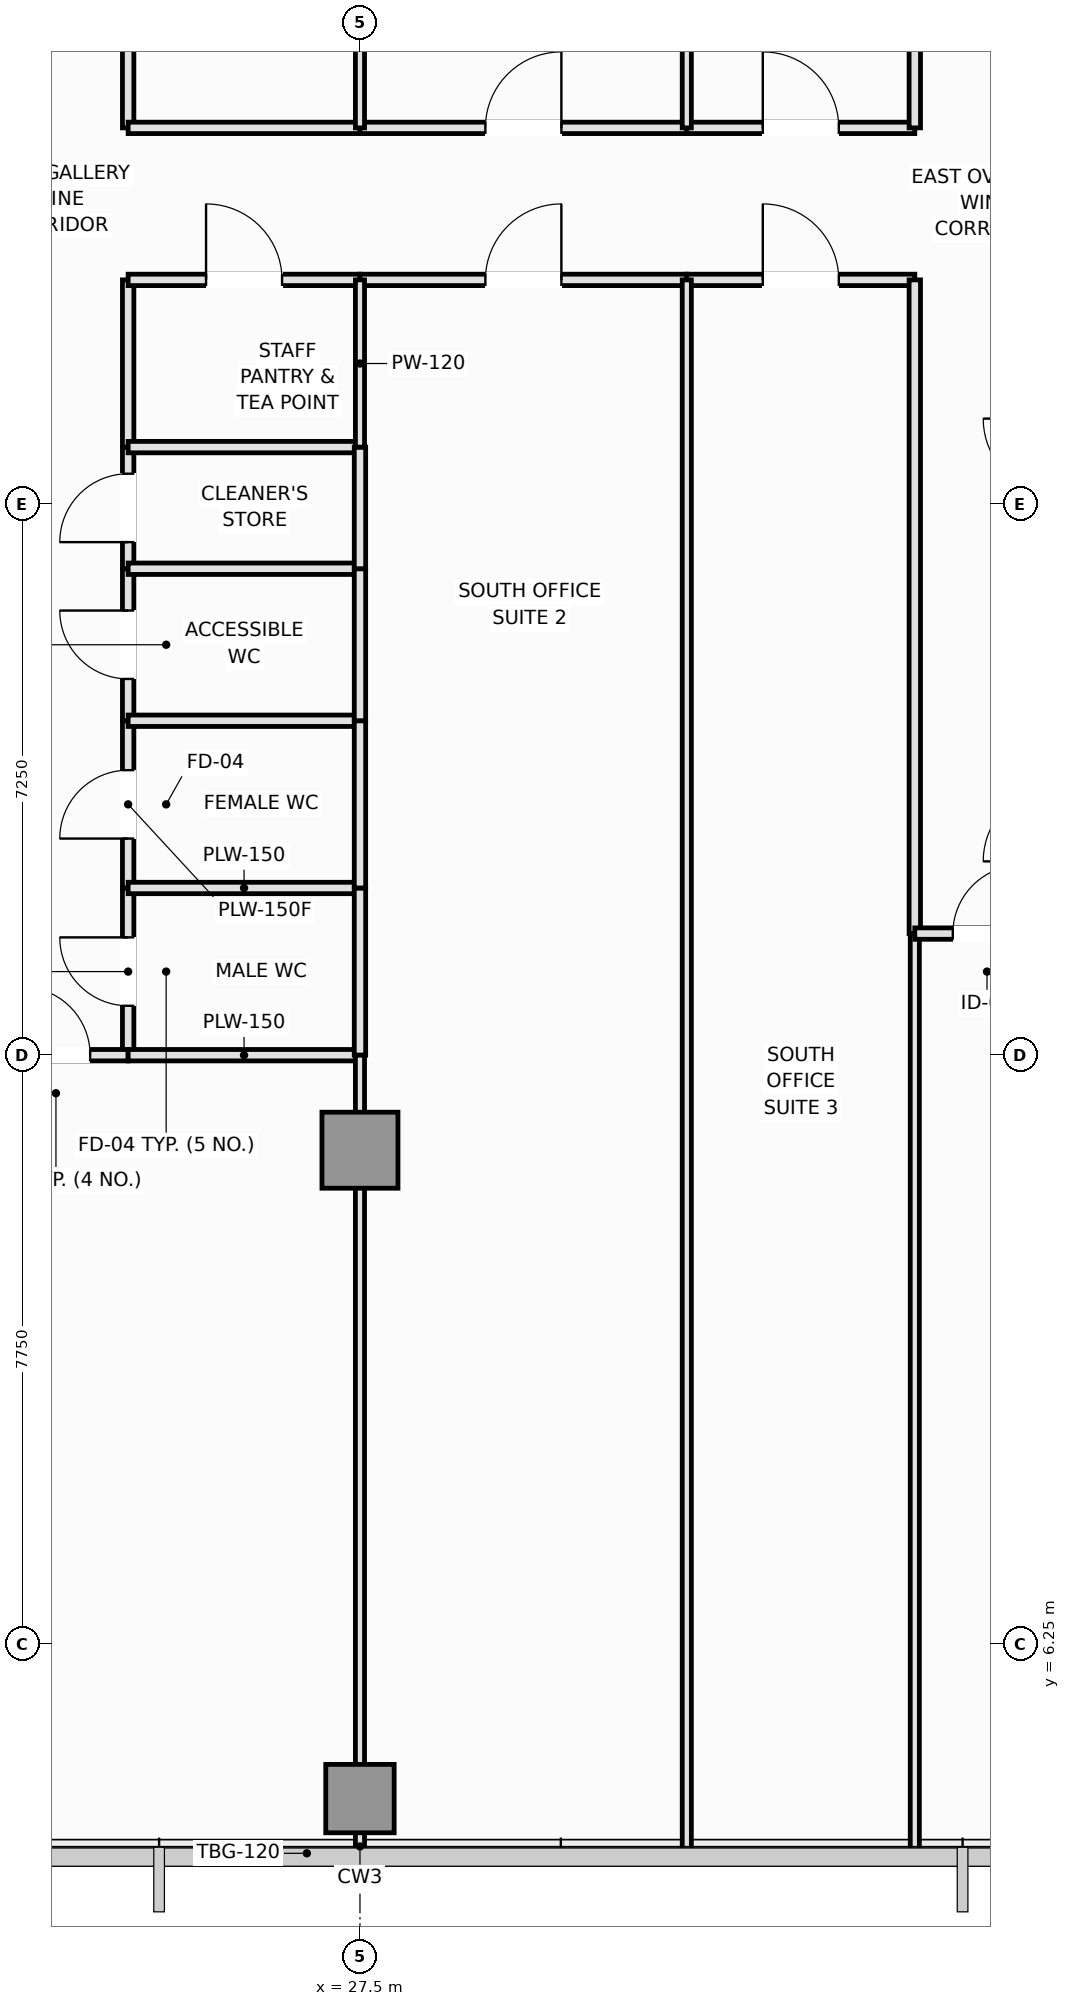
"""IFC4 building model, lengths in metres.
Left out: names, types, materials, properties, quantities, classifications, styles, units other than length and angle.
Written with IfcOpenShell. Run it as: python <this file> out.ifc"""

import sys

from ifc_helpers import new_model, si_unit, direction, frame, frame_2d, origin, origin_2d, place, context, subcontext, project, spatial, rectangle, extrude, element, fill, save


model = new_model("IFC4")
c1 = context("Model", 3, precision=1e-05, world=origin(), true_north=direction((0.0, 1.0)))
c2 = subcontext(c1, "Body", "Model", "MODEL_VIEW")
j1 = project(units=[si_unit("LENGTHUNIT", "METRE"), si_unit("PLANEANGLEUNIT", "RADIAN")], contexts=[c1])
p1 = place(None, origin())
s1 = spatial("IfcSite", under=j1, at=p1, CompositionType="ELEMENT")
p2 = place(p1, origin())
s2 = spatial("IfcBuilding", under=s1, at=p2, CompositionType="ELEMENT")
p3 = place(p2, frame((0.0, 0.0, 102.25)))
s3 = spatial("IfcBuildingStorey", under=s2, at=p3, CompositionType="ELEMENT", Elevation=102.25)
p4 = place(p3, frame((27.5, 12.75, 0.0), z_axis=(0.0, 0.0, 1.0), x_axis=(1.0, 0.0, 0.0)))
e1 = element("IfcColumn", 1, at=p4, inside=s3, PredefinedType="COLUMN", context=c2, shape_type="SweptSolid", body=[
    extrude(rectangle(XDim=1.0, YDim=1.0, at=origin_2d()), origin(), (0.0, 0.0, 1.0), 3.55),
])
p5 = place(p3, frame((27.5, 4.22, 0.0), z_axis=(0.0, 0.0, 1.0), x_axis=(1.0, 0.0, 0.0)))
e2 = element("IfcColumn", 2, at=p5, inside=s3, PredefinedType="COLUMN", context=c2, shape_type="SweptSolid", body=[
    extrude(rectangle(XDim=0.9, YDim=0.9, at=origin_2d()), origin(), (0.0, 0.0, 1.0), 3.55),
])
p6 = place(p3, frame((24.45, 14.0, 0.0), z_axis=(0.0, 0.0, 1.0), x_axis=(0.0, 1.0, 0.0)))
e3 = element("IfcWall", 3, at=p6, inside=s3, PredefinedType="PLUMBINGWALL", context=c2, shape_type="SweptSolid", body=[
    extrude(rectangle(XDim=2.2, YDim=0.15, at=frame_2d((1.1, 0.0))), origin(), (0.0, 0.0, 1.0), 3.37),
])
p7 = place(p6, frame((0.65, 0.0, 0.0)))
e4 = element("IfcOpeningElement", 4, at=p7, cuts=e3, PredefinedType="OPENING", context=c2, shape_type="SweptSolid", body=[
    extrude(rectangle(XDim=0.9, YDim=2.1, at=frame_2d((0.45, 1.05))), frame((0.0, 0.085, 0.0), z_axis=(0.0, -1.0, 0.0), x_axis=(1.0, 0.0, 0.0)), (0.0, 0.0, 1.0), 0.17),
])
p8 = place(p3, frame((24.45, 16.2, 0.0), z_axis=(0.0, 0.0, 1.0), x_axis=(0.0, 1.0, 0.0)))
e5 = element("IfcWall", 5, at=p8, inside=s3, PredefinedType="PLUMBINGWALL", context=c2, shape_type="SweptSolid", body=[
    extrude(rectangle(XDim=2.2, YDim=0.15, at=frame_2d((1.1, 0.0))), origin(), (0.0, 0.0, 1.0), 3.37),
])
p9 = place(p8, frame((0.65, 0.0, 0.0)))
e6 = element("IfcOpeningElement", 6, at=p9, cuts=e5, PredefinedType="OPENING", context=c2, shape_type="SweptSolid", body=[
    extrude(rectangle(XDim=0.9, YDim=2.1, at=frame_2d((0.45, 1.05))), frame((0.0, 0.085, 0.0), z_axis=(0.0, -1.0, 0.0), x_axis=(1.0, 0.0, 0.0)), (0.0, 0.0, 1.0), 0.17),
])
p10 = place(p3, frame((24.45, 18.4, 0.0), z_axis=(0.0, 0.0, 1.0), x_axis=(0.0, 1.0, 0.0)))
e7 = element("IfcWall", 7, at=p10, inside=s3, PredefinedType="PLUMBINGWALL", context=c2, shape_type="SweptSolid", body=[
    extrude(rectangle(XDim=2.0, YDim=0.15, at=frame_2d((1.0, 0.0))), origin(), (0.0, 0.0, 1.0), 3.37),
])
p11 = place(p10, frame((0.55, 0.0, 0.0)))
e8 = element("IfcOpeningElement", 8, at=p11, cuts=e7, PredefinedType="OPENING", context=c2, shape_type="SweptSolid", body=[
    extrude(rectangle(XDim=0.9, YDim=2.1, at=frame_2d((0.45, 1.05))), frame((0.0, 0.085, 0.0), z_axis=(0.0, -1.0, 0.0), x_axis=(1.0, 0.0, 0.0)), (0.0, 0.0, 1.0), 0.17),
])
p12 = place(p3, frame((24.45, 20.4, 0.0), z_axis=(0.0, 0.0, 1.0), x_axis=(0.0, 1.0, 0.0)))
e9 = element("IfcWall", 9, at=p12, inside=s3, PredefinedType="PLUMBINGWALL", context=c2, shape_type="SweptSolid", body=[
    extrude(rectangle(XDim=1.6, YDim=0.15, at=frame_2d((0.8, 0.0))), origin(), (0.0, 0.0, 1.0), 3.37),
])
p13 = place(p12, frame((0.35, 0.0, 0.0)))
e10 = element("IfcOpeningElement", 10, at=p13, cuts=e9, PredefinedType="OPENING", context=c2, shape_type="SweptSolid", body=[
    extrude(rectangle(XDim=0.9, YDim=2.1, at=frame_2d((0.45, 1.05))), frame((0.0, 0.085, 0.0), z_axis=(0.0, -1.0, 0.0), x_axis=(1.0, 0.0, 0.0)), (0.0, 0.0, 1.0), 0.17),
])
p14 = place(p3, frame((24.45, 22.0, 0.0), z_axis=(0.0, 0.0, 1.0), x_axis=(0.0, 1.0, 0.0)))
e11 = element("IfcWall", 11, at=p14, inside=s3, PredefinedType="PARTITIONING", context=c2, shape_type="SweptSolid", body=[
    extrude(rectangle(XDim=2.2, YDim=0.15, at=frame_2d((1.1, 0.0))), origin(), (0.0, 0.0, 1.0), 3.37),
])
p15 = place(p3, frame((24.45, 26.2, 0.0), z_axis=(0.0, 0.0, 1.0), x_axis=(0.0, 1.0, 0.0)))
e12 = element("IfcWall", 12, at=p15, inside=s3, PredefinedType="PARTITIONING", context=c2, shape_type="SweptSolid", body=[
    extrude(rectangle(XDim=3.4, YDim=0.15, at=frame_2d((1.7, 0.0))), origin(), (0.0, 0.0, 1.0), 3.37),
])
p16 = place(p15, frame((1.2, 0.0, 0.0)))
e13 = element("IfcOpeningElement", 13, at=p16, cuts=e12, PredefinedType="OPENING", context=c2, shape_type="SweptSolid", body=[
    extrude(rectangle(XDim=1.0, YDim=2.15, at=frame_2d((0.5, 1.075))), frame((0.0, 0.085, 0.0), z_axis=(0.0, -1.0, 0.0), x_axis=(1.0, 0.0, 0.0)), (0.0, 0.0, 1.0), 0.17),
])
p17 = place(p3, frame((22.55, 14.0, 0.0), z_axis=(0.0, 0.0, 1.0), x_axis=(1.0, 0.0, 0.0)))
e14 = element("IfcWall", 14, at=p17, inside=s3, PredefinedType="PARTITIONING", context=c2, shape_type="SweptSolid", body=[
    extrude(rectangle(XDim=1.9, YDim=0.15, at=frame_2d((0.95, 0.0))), origin(), (0.0, 0.0, 1.0), 3.37),
])
p18 = place(p17, frame((0.5, 0.0, 0.0)))
e15 = element("IfcOpeningElement", 15, at=p18, cuts=e14, PredefinedType="OPENING", context=c2, shape_type="SweptSolid", body=[
    extrude(rectangle(XDim=0.9, YDim=2.1, at=frame_2d((0.45, 1.05))), frame((0.0, 0.085, 0.0), z_axis=(0.0, -1.0, 0.0), x_axis=(1.0, 0.0, 0.0)), (0.0, 0.0, 1.0), 0.17),
])
p19 = place(p3, frame((24.45, 24.2, 0.0), z_axis=(0.0, 0.0, 1.0), x_axis=(1.0, 0.0, 0.0)))
e16 = element("IfcWall", 16, at=p19, inside=s3, PredefinedType="PARTITIONING", context=c2, shape_type="SweptSolid", body=[
    extrude(rectangle(XDim=3.05, YDim=0.15, at=frame_2d((1.525, 0.0))), origin(), (0.0, 0.0, 1.0), 3.37),
])
p20 = place(p19, frame((1.025, 0.0, 0.0)))
e17 = element("IfcOpeningElement", 17, at=p20, cuts=e16, PredefinedType="OPENING", context=c2, shape_type="SweptSolid", body=[
    extrude(rectangle(XDim=1.0, YDim=2.15, at=frame_2d((0.5, 1.075))), frame((0.0, 0.085, 0.0), z_axis=(0.0, -1.0, 0.0), x_axis=(1.0, 0.0, 0.0)), (0.0, 0.0, 1.0), 0.17),
])
p21 = place(p3, frame((24.45, 26.2, 0.0), z_axis=(0.0, 0.0, 1.0), x_axis=(1.0, 0.0, 0.0)))
e18 = element("IfcWall", 18, at=p21, inside=s3, PredefinedType="PARTITIONING", context=c2, shape_type="SweptSolid", body=[
    extrude(rectangle(XDim=3.05, YDim=0.15, at=frame_2d((1.525, 0.0))), origin(), (0.0, 0.0, 1.0), 3.37),
])
p22 = place(p3, frame((27.5, 24.2, 0.0), z_axis=(0.0, 0.0, 1.0), x_axis=(1.0, 0.0, 0.0)))
e19 = element("IfcWall", 19, at=p22, inside=s3, PredefinedType="PARTITIONING", context=c2, shape_type="SweptSolid", body=[
    extrude(rectangle(XDim=4.3, YDim=0.15, at=frame_2d((2.15, 0.0))), origin(), (0.0, 0.0, 1.0), 3.37),
])
p23 = place(p22, frame((1.65, 0.0, 0.0)))
e20 = element("IfcOpeningElement", 20, at=p23, cuts=e19, PredefinedType="OPENING", context=c2, shape_type="SweptSolid", body=[
    extrude(rectangle(XDim=1.0, YDim=2.15, at=frame_2d((0.5, 1.075))), frame((0.0, 0.085, 0.0), z_axis=(0.0, -1.0, 0.0), x_axis=(1.0, 0.0, 0.0)), (0.0, 0.0, 1.0), 0.17),
])
p24 = place(p3, frame((31.8, 24.2, 0.0), z_axis=(0.0, 0.0, 1.0), x_axis=(1.0, 0.0, 0.0)))
e21 = element("IfcWall", 21, at=p24, inside=s3, PredefinedType="PARTITIONING", context=c2, shape_type="SweptSolid", body=[
    extrude(rectangle(XDim=3.0, YDim=0.15, at=frame_2d((1.5, 0.0))), origin(), (0.0, 0.0, 1.0), 3.37),
])
p25 = place(p24, frame((1.0, 0.0, 0.0)))
e22 = element("IfcOpeningElement", 22, at=p25, cuts=e21, PredefinedType="OPENING", context=c2, shape_type="SweptSolid", body=[
    extrude(rectangle(XDim=1.0, YDim=2.15, at=frame_2d((0.5, 1.075))), frame((0.0, 0.085, 0.0), z_axis=(0.0, -1.0, 0.0), x_axis=(1.0, 0.0, 0.0)), (0.0, 0.0, 1.0), 0.17),
])
p26 = place(p3, frame((27.5, 26.2, 0.0), z_axis=(0.0, 0.0, 1.0), x_axis=(1.0, 0.0, 0.0)))
e23 = element("IfcWall", 23, at=p26, inside=s3, PredefinedType="PARTITIONING", context=c2, shape_type="SweptSolid", body=[
    extrude(rectangle(XDim=4.3, YDim=0.15, at=frame_2d((2.15, 0.0))), origin(), (0.0, 0.0, 1.0), 3.37),
])
p27 = place(p26, frame((1.65, 0.0, 0.0)))
e24 = element("IfcOpeningElement", 24, at=p27, cuts=e23, PredefinedType="OPENING", context=c2, shape_type="SweptSolid", body=[
    extrude(rectangle(XDim=1.0, YDim=2.15, at=frame_2d((0.5, 1.075))), frame((0.0, 0.085, 0.0), z_axis=(0.0, -1.0, 0.0), x_axis=(1.0, 0.0, 0.0)), (0.0, 0.0, 1.0), 0.17),
])
p28 = place(p3, frame((31.8, 26.2, 0.0), z_axis=(0.0, 0.0, 1.0), x_axis=(1.0, 0.0, 0.0)))
e25 = element("IfcWall", 25, at=p28, inside=s3, PredefinedType="PARTITIONING", context=c2, shape_type="SweptSolid", body=[
    extrude(rectangle(XDim=3.0, YDim=0.15, at=frame_2d((1.5, 0.0))), origin(), (0.0, 0.0, 1.0), 3.37),
])
p29 = place(p28, frame((1.0, 0.0, 0.0)))
e26 = element("IfcOpeningElement", 26, at=p29, cuts=e25, PredefinedType="OPENING", context=c2, shape_type="SweptSolid", body=[
    extrude(rectangle(XDim=1.0, YDim=2.15, at=frame_2d((0.5, 1.075))), frame((0.0, 0.085, 0.0), z_axis=(0.0, -1.0, 0.0), x_axis=(1.0, 0.0, 0.0)), (0.0, 0.0, 1.0), 0.17),
])
for number, where, z_axis, x_axis in (
    (27, (24.45, 16.2, 0.0), (0.0, 0.0, 1.0), (1.0, 0.0, 0.0)),
    (28, (24.45, 14.0, 0.0), (0.0, 0.0, 1.0), (1.0, 0.0, 0.0)),
):
    element("IfcWall", number, at=place(p3, frame(where, z_axis=z_axis, x_axis=x_axis)), inside=s3, PredefinedType="PLUMBINGWALL", context=c2, shape_type="SweptSolid", body=[
        extrude(rectangle(XDim=3.05, YDim=0.15, at=frame_2d((1.525, 0.0))), origin(), (0.0, 0.0, 1.0), 3.37),
    ])
p30 = place(p3, frame((27.5, 14.0, 0.0), z_axis=(0.0, 0.0, 1.0), x_axis=(0.0, 1.0, 0.0)))
e29 = element("IfcWall", 29, at=p30, inside=s3, PredefinedType="PLUMBINGWALL", context=c2, shape_type="SweptSolid", body=[
    extrude(rectangle(XDim=2.2, YDim=0.15, at=frame_2d((1.1, 0.0))), origin(), (0.0, 0.0, 1.0), 3.37),
])
p31 = place(p3, frame((24.45, 18.4, 0.0), z_axis=(0.0, 0.0, 1.0), x_axis=(1.0, 0.0, 0.0)))
e30 = element("IfcWall", 30, at=p31, inside=s3, PredefinedType="PLUMBINGWALL", context=c2, shape_type="SweptSolid", body=[
    extrude(rectangle(XDim=3.05, YDim=0.15, at=frame_2d((1.525, 0.0))), origin(), (0.0, 0.0, 1.0), 2.77),
])
p32 = place(p3, frame((27.5, 16.2, 0.0), z_axis=(0.0, 0.0, 1.0), x_axis=(0.0, 1.0, 0.0)))
e31 = element("IfcWall", 31, at=p32, inside=s3, PredefinedType="PLUMBINGWALL", context=c2, shape_type="SweptSolid", body=[
    extrude(rectangle(XDim=2.2, YDim=0.15, at=frame_2d((1.1, 0.0))), origin(), (0.0, 0.0, 1.0), 3.37),
])
p33 = place(p3, frame((24.45, 20.4, 0.0), z_axis=(0.0, 0.0, 1.0), x_axis=(1.0, 0.0, 0.0)))
e32 = element("IfcWall", 32, at=p33, inside=s3, PredefinedType="PLUMBINGWALL", context=c2, shape_type="SweptSolid", body=[
    extrude(rectangle(XDim=3.05, YDim=0.15, at=frame_2d((1.525, 0.0))), origin(), (0.0, 0.0, 1.0), 3.37),
])
p34 = place(p3, frame((27.5, 18.4, 0.0), z_axis=(0.0, 0.0, 1.0), x_axis=(0.0, 1.0, 0.0)))
e33 = element("IfcWall", 33, at=p34, inside=s3, PredefinedType="PLUMBINGWALL", context=c2, shape_type="SweptSolid", body=[
    extrude(rectangle(XDim=2.0, YDim=0.15, at=frame_2d((1.0, 0.0))), origin(), (0.0, 0.0, 1.0), 3.37),
])
p35 = place(p3, frame((24.45, 22.0, 0.0), z_axis=(0.0, 0.0, 1.0), x_axis=(1.0, 0.0, 0.0)))
e34 = element("IfcWall", 34, at=p35, inside=s3, PredefinedType="PLUMBINGWALL", context=c2, shape_type="SweptSolid", body=[
    extrude(rectangle(XDim=3.05, YDim=0.15, at=frame_2d((1.525, 0.0))), origin(), (0.0, 0.0, 1.0), 3.37),
])
p36 = place(p3, frame((27.5, 20.4, 0.0), z_axis=(0.0, 0.0, 1.0), x_axis=(0.0, 1.0, 0.0)))
e35 = element("IfcWall", 35, at=p36, inside=s3, PredefinedType="PLUMBINGWALL", context=c2, shape_type="SweptSolid", body=[
    extrude(rectangle(XDim=1.6, YDim=0.15, at=frame_2d((0.8, 0.0))), origin(), (0.0, 0.0, 1.0), 3.37),
])
p37 = place(p3, frame((27.5, 22.0, 0.0), z_axis=(0.0, 0.0, 1.0), x_axis=(0.0, 1.0, 0.0)))
e36 = element("IfcWall", 36, at=p37, inside=s3, PredefinedType="PARTITIONING", context=c2, shape_type="SweptSolid", body=[
    extrude(rectangle(XDim=2.2, YDim=0.12, at=frame_2d((1.1, 0.0))), origin(), (0.0, 0.0, 1.0), 3.37),
])
p38 = place(p3, frame((27.5, 26.2, 0.0), z_axis=(0.0, 0.0, 1.0), x_axis=(0.0, 1.0, 0.0)))
e37 = element("IfcWall", 37, at=p38, inside=s3, PredefinedType="PARTITIONING", context=c2, shape_type="SweptSolid", body=[
    extrude(rectangle(XDim=3.4, YDim=0.12, at=frame_2d((1.7, 0.0))), origin(), (0.0, 0.0, 1.0), 3.37),
])
p39 = place(p3, frame((27.5, 3.51, 0.0), z_axis=(0.0, 0.0, 1.0), x_axis=(0.0, 1.0, 0.0)))
e38 = element("IfcWall", 38, at=p39, inside=s3, PredefinedType="PARTITIONING", context=c2, shape_type="SweptSolid", body=[
    extrude(rectangle(XDim=10.49, YDim=0.12, at=frame_2d((5.245, 0.0))), origin(), (0.0, 0.0, 1.0), 2.87),
])
p40 = place(p3, frame((31.8, 3.51, 0.0), z_axis=(0.0, 0.0, 1.0), x_axis=(0.0, 1.0, 0.0)))
e39 = element("IfcWall", 39, at=p40, inside=s3, PredefinedType="PARTITIONING", context=c2, shape_type="SweptSolid", body=[
    extrude(rectangle(XDim=20.69, YDim=0.12, at=frame_2d((10.345, 0.0))), origin(), (0.0, 0.0, 1.0), 3.37),
])
p41 = place(p3, frame((34.8, 15.6, 0.0), z_axis=(0.0, 0.0, 1.0), x_axis=(0.0, 1.0, 0.0)))
e40 = element("IfcWall", 40, at=p41, inside=s3, PredefinedType="PARTITIONING", context=c2, shape_type="SweptSolid", body=[
    extrude(rectangle(XDim=8.6, YDim=0.15, at=frame_2d((4.3, 0.0))), origin(), (0.0, 0.0, 1.0), 3.37),
])
p42 = place(p3, frame((34.8, 3.51, 0.0), z_axis=(0.0, 0.0, 1.0), x_axis=(0.0, 1.0, 0.0)))
e41 = element("IfcWall", 41, at=p42, inside=s3, PredefinedType="PARTITIONING", context=c2, shape_type="SweptSolid", body=[
    extrude(rectangle(XDim=12.09, YDim=0.12, at=frame_2d((6.045, 0.0))), origin(), (0.0, 0.0, 1.0), 3.37),
])
p43 = place(p3, frame((31.8, 26.2, 0.0), z_axis=(0.0, 0.0, 1.0), x_axis=(0.0, 1.0, 0.0)))
e42 = element("IfcWall", 42, at=p43, inside=s3, PredefinedType="PARTITIONING", context=c2, shape_type="SweptSolid", body=[
    extrude(rectangle(XDim=20.29, YDim=0.12, at=frame_2d((10.145, 0.0))), origin(), (0.0, 0.0, 1.0), 3.37),
])
p44 = place(p3, frame((34.8, 26.2, 0.0), z_axis=(0.0, 0.0, 1.0), x_axis=(0.0, 1.0, 0.0)))
e43 = element("IfcWall", 43, at=p44, inside=s3, PredefinedType="PARTITIONING", context=c2, shape_type="SweptSolid", body=[
    extrude(rectangle(XDim=8.8, YDim=0.15, at=frame_2d((4.4, 0.0))), origin(), (0.0, 0.0, 1.0), 3.37),
])
p45 = place(p3, frame((34.8, 15.6, 0.0), z_axis=(0.0, 0.0, 1.0), x_axis=(1.0, 0.0, 0.0)))
e44 = element("IfcWall", 44, at=p45, inside=s3, PredefinedType="PARTITIONING", context=c2, shape_type="SweptSolid", body=[
    extrude(rectangle(XDim=1.9, YDim=0.15, at=frame_2d((0.95, 0.0))), origin(), (0.0, 0.0, 1.0), 3.37),
])
p46 = place(p45, frame((0.5, 0.0, 0.0)))
e45 = element("IfcOpeningElement", 45, at=p46, cuts=e44, PredefinedType="OPENING", context=c2, shape_type="SweptSolid", body=[
    extrude(rectangle(XDim=0.9, YDim=2.1, at=frame_2d((0.45, 1.05))), frame((0.0, 0.085, 0.0), z_axis=(0.0, -1.0, 0.0), x_axis=(1.0, 0.0, 0.0)), (0.0, 0.0, 1.0), 0.17),
])
p47 = place(p7, origin())
e46 = element("IfcDoor", 46, at=p47, inside=s3, OperationType="SINGLE_SWING_RIGHT", PredefinedType="DOOR", context=c2, shape_type="SweptSolid", body=[
    extrude(rectangle(XDim=0.9, YDim=2.1, at=frame_2d((0.45, 1.05))), frame((0.0, 0.025, 0.0), z_axis=(0.0, -1.0, 0.0), x_axis=(1.0, 0.0, 0.0)), (0.0, 0.0, 1.0), 0.05),
])
fill(e4, e46)
p48 = place(p9, origin())
e47 = element("IfcDoor", 47, at=p48, inside=s3, OperationType="SINGLE_SWING_LEFT", PredefinedType="DOOR", context=c2, shape_type="SweptSolid", body=[
    extrude(rectangle(XDim=0.9, YDim=2.1, at=frame_2d((0.45, 1.05))), frame((0.0, 0.025, 0.0), z_axis=(0.0, -1.0, 0.0), x_axis=(1.0, 0.0, 0.0)), (0.0, 0.0, 1.0), 0.05),
])
fill(e6, e47)
p49 = place(p11, origin())
e48 = element("IfcDoor", 48, at=p49, inside=s3, OperationType="SINGLE_SWING_RIGHT", PredefinedType="DOOR", context=c2, shape_type="SweptSolid", body=[
    extrude(rectangle(XDim=0.9, YDim=2.1, at=frame_2d((0.45, 1.05))), frame((0.0, 0.025, 0.0), z_axis=(0.0, -1.0, 0.0), x_axis=(1.0, 0.0, 0.0)), (0.0, 0.0, 1.0), 0.05),
])
fill(e8, e48)
p50 = place(p13, origin())
e49 = element("IfcDoor", 49, at=p50, inside=s3, OperationType="SINGLE_SWING_LEFT", PredefinedType="DOOR", context=c2, shape_type="SweptSolid", body=[
    extrude(rectangle(XDim=0.9, YDim=2.1, at=frame_2d((0.45, 1.05))), frame((0.0, 0.025, 0.0), z_axis=(0.0, -1.0, 0.0), x_axis=(1.0, 0.0, 0.0)), (0.0, 0.0, 1.0), 0.05),
])
fill(e10, e49)
p51 = place(p18, origin())
e50 = element("IfcDoor", 50, at=p51, inside=s3, OperationType="SINGLE_SWING_LEFT", PredefinedType="DOOR", context=c2, shape_type="SweptSolid", body=[
    extrude(rectangle(XDim=0.9, YDim=2.1, at=frame_2d((0.45, 1.05))), frame((0.0, 0.025, 0.0), z_axis=(0.0, -1.0, 0.0), x_axis=(1.0, 0.0, 0.0)), (0.0, 0.0, 1.0), 0.05),
])
fill(e15, e50)
p52 = place(p20, origin())
e51 = element("IfcDoor", 51, at=p52, inside=s3, OperationType="SINGLE_SWING_LEFT", PredefinedType="DOOR", context=c2, shape_type="SweptSolid", body=[
    extrude(rectangle(XDim=1.0, YDim=2.15, at=frame_2d((0.5, 1.075))), frame((0.0, 0.025, 0.0), z_axis=(0.0, -1.0, 0.0), x_axis=(1.0, 0.0, 0.0)), (0.0, 0.0, 1.0), 0.05),
])
fill(e17, e51)
p53 = place(p23, origin())
e52 = element("IfcDoor", 52, at=p53, inside=s3, OperationType="SINGLE_SWING_RIGHT", PredefinedType="DOOR", context=c2, shape_type="SweptSolid", body=[
    extrude(rectangle(XDim=1.0, YDim=2.15, at=frame_2d((0.5, 1.075))), frame((0.0, 0.025, 0.0), z_axis=(0.0, -1.0, 0.0), x_axis=(1.0, 0.0, 0.0)), (0.0, 0.0, 1.0), 0.05),
])
fill(e20, e52)
p54 = place(p25, origin())
e53 = element("IfcDoor", 53, at=p54, inside=s3, OperationType="SINGLE_SWING_LEFT", PredefinedType="DOOR", context=c2, shape_type="SweptSolid", body=[
    extrude(rectangle(XDim=1.0, YDim=2.15, at=frame_2d((0.5, 1.075))), frame((0.0, 0.025, 0.0), z_axis=(0.0, -1.0, 0.0), x_axis=(1.0, 0.0, 0.0)), (0.0, 0.0, 1.0), 0.05),
])
fill(e22, e53)
p55 = place(p27, origin())
e54 = element("IfcDoor", 54, at=p55, inside=s3, OperationType="SINGLE_SWING_RIGHT", PredefinedType="DOOR", context=c2, shape_type="SweptSolid", body=[
    extrude(rectangle(XDim=1.0, YDim=2.15, at=frame_2d((0.5, 1.075))), frame((0.0, 0.025, 0.0), z_axis=(0.0, -1.0, 0.0), x_axis=(1.0, 0.0, 0.0)), (0.0, 0.0, 1.0), 0.05),
])
fill(e24, e54)
p56 = place(p29, origin())
e55 = element("IfcDoor", 55, at=p56, inside=s3, OperationType="SINGLE_SWING_LEFT", PredefinedType="DOOR", context=c2, shape_type="SweptSolid", body=[
    extrude(rectangle(XDim=1.0, YDim=2.15, at=frame_2d((0.5, 1.075))), frame((0.0, 0.025, 0.0), z_axis=(0.0, -1.0, 0.0), x_axis=(1.0, 0.0, 0.0)), (0.0, 0.0, 1.0), 0.05),
])
fill(e26, e55)
p57 = place(p46, origin())
e56 = element("IfcDoor", 56, at=p57, inside=s3, OperationType="SINGLE_SWING_RIGHT", PredefinedType="DOOR", context=c2, shape_type="SweptSolid", body=[
    extrude(rectangle(XDim=0.9, YDim=2.1, at=frame_2d((0.45, 1.05))), frame((0.0, 0.025, 0.0), z_axis=(0.0, -1.0, 0.0), x_axis=(1.0, 0.0, 0.0)), (0.0, 0.0, 1.0), 0.05),
])
fill(e45, e56)
save(model, sys.argv[1])
